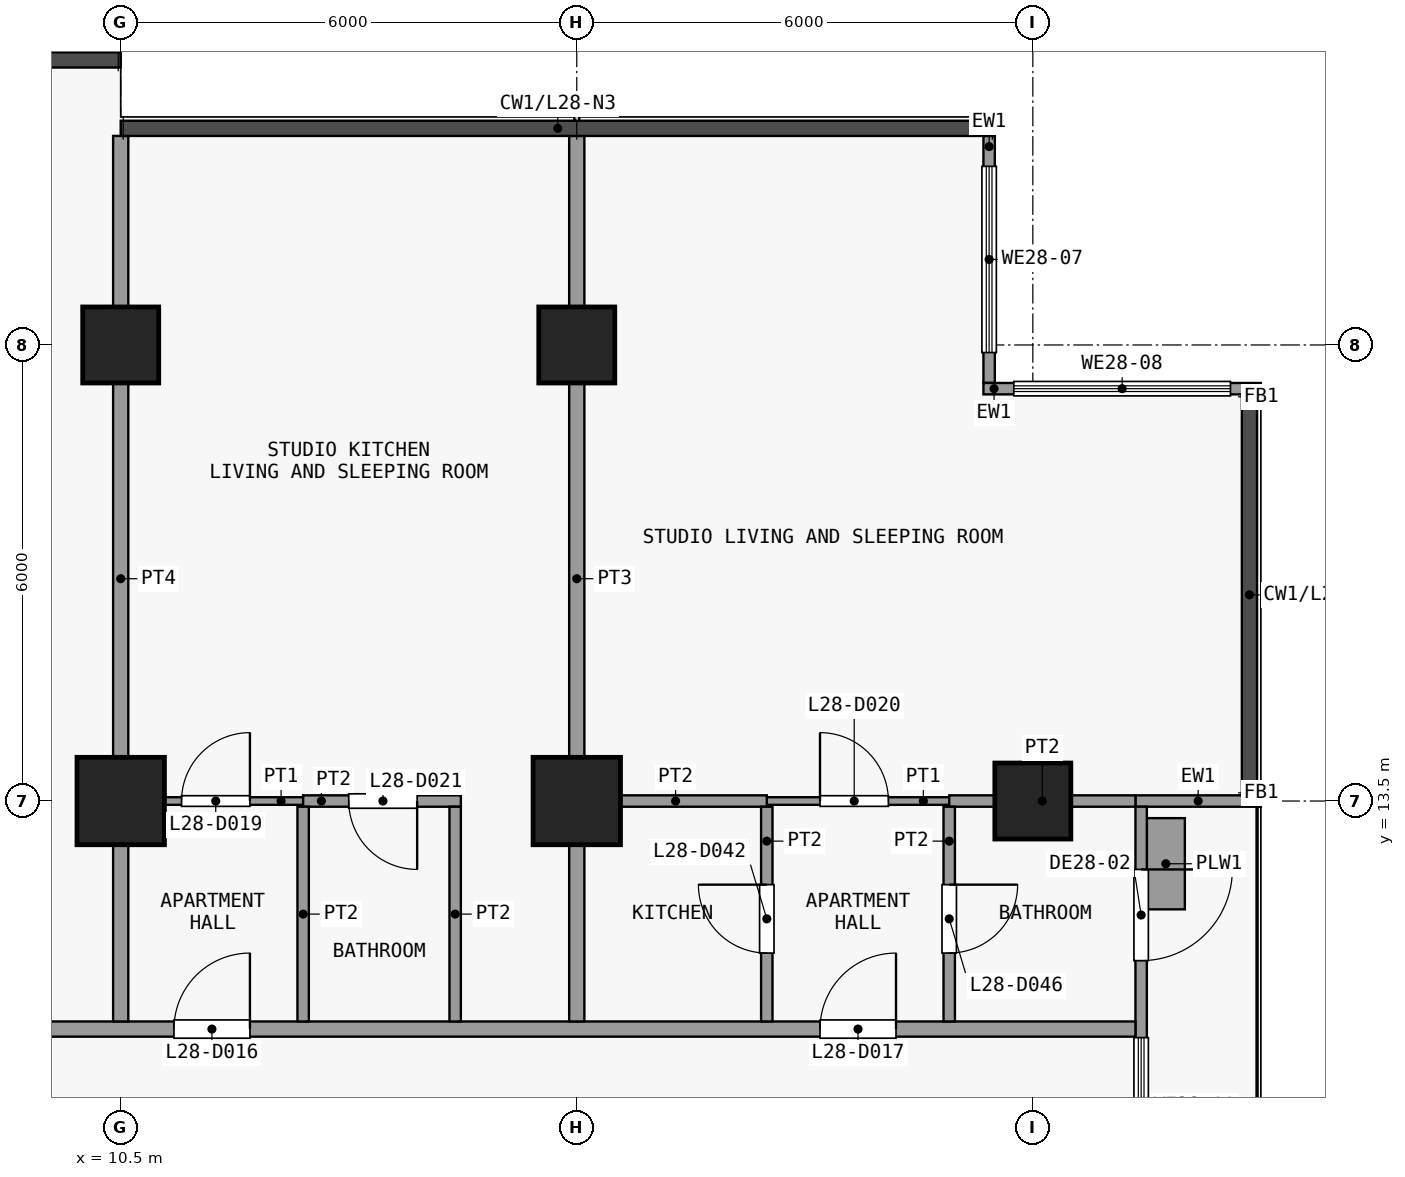
"""IFC4 building model, lengths in metres.
Left out: names, types, materials, properties, quantities, classifications, styles, units other than length and angle.
Written with IfcOpenShell. Run it as: python <this file> out.ifc"""

import sys

from ifc_helpers import new_model, si_unit, direction, frame, frame_2d, origin, origin_2d, place, context, subcontext, project, spatial, rectangle, extrude, element, fill, save


model = new_model("IFC4")
c1 = context("Model", 3, precision=1e-05, world=origin(), true_north=direction((0.0, 1.0)))
c2 = subcontext(c1, "Body", "Model", "MODEL_VIEW")
j1 = project(units=[si_unit("LENGTHUNIT", "METRE"), si_unit("PLANEANGLEUNIT", "RADIAN")], contexts=[c1])
p1 = place(None, origin())
s1 = spatial("IfcSite", under=j1, at=p1, CompositionType="ELEMENT")
p2 = place(p1, origin())
s2 = spatial("IfcBuilding", under=s1, at=p2, CompositionType="ELEMENT")
p3 = place(p2, frame((0.0, 0.0, 113.5)))
s3 = spatial("IfcBuildingStorey", under=s2, at=p3, CompositionType="ELEMENT", Elevation=113.5)
p4 = place(p3, frame((10.5, 13.5, 0.0), z_axis=(0.0, 0.0, 1.0), x_axis=(1.0, 0.0, 0.0)))
e1 = element("IfcColumn", 1, at=p4, inside=s3, PredefinedType="COLUMN", context=c2, shape_type="SweptSolid", body=[
    extrude(rectangle(XDim=1.15, YDim=1.15, at=origin_2d()), origin(), (0.0, 0.0, 1.0), 3.6),
])
p5 = place(p3, frame((10.5, 19.5, 0.0), z_axis=(0.0, 0.0, 1.0), x_axis=(1.0, 0.0, 0.0)))
e2 = element("IfcColumn", 2, at=p5, inside=s3, PredefinedType="COLUMN", context=c2, shape_type="SweptSolid", body=[
    extrude(rectangle(XDim=1.0, YDim=1.0, at=origin_2d()), origin(), (0.0, 0.0, 1.0), 3.6),
])
p6 = place(p3, frame((16.5, 13.5, 0.0), z_axis=(0.0, 0.0, 1.0), x_axis=(1.0, 0.0, 0.0)))
e3 = element("IfcColumn", 3, at=p6, inside=s3, PredefinedType="COLUMN", context=c2, shape_type="SweptSolid", body=[
    extrude(rectangle(XDim=1.15, YDim=1.15, at=origin_2d()), origin(), (0.0, 0.0, 1.0), 3.6),
])
for number, where, z_axis, x_axis in (
    (4, (16.5, 19.5, 0.0), (0.0, 0.0, 1.0), (1.0, 0.0, 0.0)),
    (5, (22.5, 13.5, 0.0), (0.0, 0.0, 1.0), (1.0, 0.0, 0.0)),
):
    element("IfcColumn", number, at=place(p3, frame(where, z_axis=z_axis, x_axis=x_axis)), inside=s3, PredefinedType="COLUMN", context=c2, shape_type="SweptSolid", body=[
        extrude(rectangle(XDim=1.0, YDim=1.0, at=origin_2d()), origin(), (0.0, 0.0, 1.0), 3.6),
    ])
p7 = place(p3, frame((21.925, 22.25, 0.0), z_axis=(0.0, 0.0, 1.0), x_axis=(0.0, -1.0, 0.0)))
e6 = element("IfcWall", 6, at=p7, inside=s3, PredefinedType="SOLIDWALL", context=c2, shape_type="SweptSolid", body=[
    extrude(rectangle(XDim=3.25, YDim=0.15, at=frame_2d((1.625, 0.0))), origin(), (0.0, 0.0, 1.0), 3.3),
])
p8 = place(p7, frame((0.4, 0.0, 0.9)))
e7 = element("IfcOpeningElement", 7, at=p8, cuts=e6, PredefinedType="OPENING", context=c2, shape_type="SweptSolid", body=[
    extrude(rectangle(XDim=2.45, YDim=2.4, at=frame_2d((1.225, 1.2))), frame((0.0, 0.085, 0.0), z_axis=(0.0, -1.0, 0.0), x_axis=(1.0, 0.0, 0.0)), (0.0, 0.0, 1.0), 0.17),
])
p9 = place(p3, frame((21.85, 18.925, 0.0), z_axis=(0.0, 0.0, 1.0), x_axis=(1.0, 0.0, 0.0)))
e8 = element("IfcWall", 8, at=p9, inside=s3, PredefinedType="SOLIDWALL", context=c2, shape_type="SweptSolid", body=[
    extrude(rectangle(XDim=3.65, YDim=0.15, at=frame_2d((1.825, 0.0))), origin(), (0.0, 0.0, 1.0), 3.3),
])
p10 = place(p9, frame((0.4, 0.0, 0.9)))
e9 = element("IfcOpeningElement", 9, at=p10, cuts=e8, PredefinedType="OPENING", context=c2, shape_type="SweptSolid", body=[
    extrude(rectangle(XDim=2.85, YDim=2.4, at=frame_2d((1.425, 1.2))), frame((0.0, 0.085, 0.0), z_axis=(0.0, -1.0, 0.0), x_axis=(1.0, 0.0, 0.0)), (0.0, 0.0, 1.0), 0.17),
])
p11 = place(p3, frame((23.85, 13.5, 0.0), z_axis=(0.0, 0.0, 1.0), x_axis=(1.0, 0.0, 0.0)))
e10 = element("IfcWall", 10, at=p11, inside=s3, PredefinedType="SOLIDWALL", context=c2, shape_type="SweptSolid", body=[
    extrude(rectangle(XDim=1.65, YDim=0.15, at=frame_2d((0.825, 0.0))), origin(), (0.0, 0.0, 1.0), 3.3),
])
p12 = place(p3, frame((23.925, 13.425, 0.0), z_axis=(0.0, 0.0, 1.0), x_axis=(0.0, -1.0, 0.0)))
e11 = element("IfcWall", 11, at=p12, inside=s3, PredefinedType="SOLIDWALL", context=c2, shape_type="SweptSolid", body=[
    extrude(rectangle(XDim=5.85, YDim=0.15, at=frame_2d((2.925, 0.0))), origin(), (0.0, 0.0, 1.0), 3.3),
])
p13 = place(p12, frame((0.825, 0.0, 0.0)))
e12 = element("IfcOpeningElement", 12, at=p13, cuts=e11, PredefinedType="OPENING", context=c2, shape_type="SweptSolid", body=[
    extrude(rectangle(XDim=1.2, YDim=2.4, at=frame_2d((0.6, 1.2))), frame((0.0, 0.085, 0.0), z_axis=(0.0, -1.0, 0.0), x_axis=(1.0, 0.0, 0.0)), (0.0, 0.0, 1.0), 0.17),
])
p14 = place(p12, frame((3.038, 0.0, 0.9)))
e13 = element("IfcOpeningElement", 13, at=p14, cuts=e11, PredefinedType="OPENING", context=c2, shape_type="SweptSolid", body=[
    extrude(rectangle(XDim=1.8, YDim=2.1, at=frame_2d((0.9, 1.05))), frame((0.0, 0.085, 0.0), z_axis=(0.0, -1.0, 0.0), x_axis=(1.0, 0.0, 0.0)), (0.0, 0.0, 1.0), 0.17),
])
p15 = place(p3, frame((24.25, 12.075, 0.0), z_axis=(0.0, 0.0, 1.0), x_axis=(0.0, 1.0, 0.0)))
e14 = element("IfcWall", 14, at=p15, inside=s3, PredefinedType="USERDEFINED", context=c2, shape_type="SweptSolid", body=[
    extrude(rectangle(XDim=1.2, YDim=0.5, at=frame_2d((0.6, 0.0))), origin(), (0.0, 0.0, 1.0), 0.9),
])
p16 = place(p3, frame((-25.35, 10.5, 0.0), z_axis=(0.0, 0.0, 1.0), x_axis=(1.0, 0.0, 0.0)))
e15 = element("IfcWall", 15, at=p16, inside=s3, PredefinedType="PARTITIONING", context=c2, shape_type="SweptSolid", body=[
    extrude(rectangle(XDim=49.2, YDim=0.2, at=frame_2d((24.6, 0.0))), origin(), (0.0, 0.0, 1.0), 3.3),
])
p17 = place(p16, frame((10.55, 0.0, 0.0)))
e16 = element("IfcOpeningElement", 16, at=p17, cuts=e15, PredefinedType="OPENING", context=c2, shape_type="SweptSolid", body=[
    extrude(rectangle(XDim=1.0, YDim=2.1, at=frame_2d((0.5, 1.05))), frame((0.0, 0.11, 0.0), z_axis=(0.0, -1.0, 0.0), x_axis=(1.0, 0.0, 0.0)), (0.0, 0.0, 1.0), 0.22),
])
p18 = place(p16, frame((17.35, 0.0, 0.0)))
e17 = element("IfcOpeningElement", 17, at=p18, cuts=e15, PredefinedType="OPENING", context=c2, shape_type="SweptSolid", body=[
    extrude(rectangle(XDim=0.9, YDim=2.1, at=frame_2d((0.45, 1.05))), frame((0.0, 0.11, 0.0), z_axis=(0.0, -1.0, 0.0), x_axis=(1.0, 0.0, 0.0)), (0.0, 0.0, 1.0), 0.22),
])
p19 = place(p16, frame((24.85, 0.0, 0.0)))
e18 = element("IfcOpeningElement", 18, at=p19, cuts=e15, PredefinedType="OPENING", context=c2, shape_type="SweptSolid", body=[
    extrude(rectangle(XDim=0.9, YDim=2.1, at=frame_2d((0.45, 1.05))), frame((0.0, 0.11, 0.0), z_axis=(0.0, -1.0, 0.0), x_axis=(1.0, 0.0, 0.0)), (0.0, 0.0, 1.0), 0.22),
])
p20 = place(p16, frame((32.35, 0.0, 0.0)))
e19 = element("IfcOpeningElement", 19, at=p20, cuts=e15, PredefinedType="OPENING", context=c2, shape_type="SweptSolid", body=[
    extrude(rectangle(XDim=0.9, YDim=2.1, at=frame_2d((0.45, 1.05))), frame((0.0, 0.11, 0.0), z_axis=(0.0, -1.0, 0.0), x_axis=(1.0, 0.0, 0.0)), (0.0, 0.0, 1.0), 0.22),
])
p21 = place(p16, frame((36.55, 0.0, 0.0)))
e20 = element("IfcOpeningElement", 20, at=p21, cuts=e15, PredefinedType="OPENING", context=c2, shape_type="SweptSolid", body=[
    extrude(rectangle(XDim=1.0, YDim=2.1, at=frame_2d((0.5, 1.05))), frame((0.0, 0.11, 0.0), z_axis=(0.0, -1.0, 0.0), x_axis=(1.0, 0.0, 0.0)), (0.0, 0.0, 1.0), 0.22),
])
p22 = place(p16, frame((45.05, 0.0, 0.0)))
e21 = element("IfcOpeningElement", 21, at=p22, cuts=e15, PredefinedType="OPENING", context=c2, shape_type="SweptSolid", body=[
    extrude(rectangle(XDim=1.0, YDim=2.1, at=frame_2d((0.5, 1.05))), frame((0.0, 0.11, 0.0), z_axis=(0.0, -1.0, 0.0), x_axis=(1.0, 0.0, 0.0)), (0.0, 0.0, 1.0), 0.22),
])
p23 = place(p3, frame((10.6, 13.5, 0.0), z_axis=(0.0, 0.0, 1.0), x_axis=(1.0, 0.0, 0.0)))
e22 = element("IfcWall", 22, at=p23, inside=s3, PredefinedType="PARTITIONING", context=c2, shape_type="SweptSolid", body=[
    extrude(rectangle(XDim=2.3, YDim=0.1, at=frame_2d((1.15, 0.0))), origin(), (0.0, 0.0, 1.0), 3.3),
])
p24 = place(p23, frame((0.7, 0.0, 0.0)))
e23 = element("IfcOpeningElement", 23, at=p24, cuts=e22, PredefinedType="OPENING", context=c2, shape_type="SweptSolid", body=[
    extrude(rectangle(XDim=0.9, YDim=2.1, at=frame_2d((0.45, 1.05))), frame((0.0, 0.06, 0.0), z_axis=(0.0, -1.0, 0.0), x_axis=(1.0, 0.0, 0.0)), (0.0, 0.0, 1.0), 0.12),
])
p25 = place(p3, frame((19.0, 13.5, 0.0), z_axis=(0.0, 0.0, 1.0), x_axis=(1.0, 0.0, 0.0)))
e24 = element("IfcWall", 24, at=p25, inside=s3, PredefinedType="PARTITIONING", context=c2, shape_type="SweptSolid", body=[
    extrude(rectangle(XDim=2.4, YDim=0.1, at=frame_2d((1.2, 0.0))), origin(), (0.0, 0.0, 1.0), 3.3),
])
p26 = place(p25, frame((0.7, 0.0, 0.0)))
e25 = element("IfcOpeningElement", 25, at=p26, cuts=e24, PredefinedType="OPENING", context=c2, shape_type="SweptSolid", body=[
    extrude(rectangle(XDim=0.9, YDim=2.1, at=frame_2d((0.45, 1.05))), frame((0.0, 0.06, 0.0), z_axis=(0.0, -1.0, 0.0), x_axis=(1.0, 0.0, 0.0)), (0.0, 0.0, 1.0), 0.12),
])
p27 = place(p3, frame((12.9, 13.5, 0.0), z_axis=(0.0, 0.0, 1.0), x_axis=(1.0, 0.0, 0.0)))
e26 = element("IfcWall", 26, at=p27, inside=s3, PredefinedType="PARTITIONING", context=c2, shape_type="SweptSolid", body=[
    extrude(rectangle(XDim=2.075, YDim=0.15, at=frame_2d((1.038, 0.0))), origin(), (0.0, 0.0, 1.0), 3.3),
])
p28 = place(p27, frame((0.6, 0.0, 0.0)))
e27 = element("IfcOpeningElement", 27, at=p28, cuts=e26, PredefinedType="OPENING", context=c2, shape_type="SweptSolid", body=[
    extrude(rectangle(XDim=0.9, YDim=2.1, at=frame_2d((0.45, 1.05))), frame((0.0, 0.085, 0.0), z_axis=(0.0, -1.0, 0.0), x_axis=(1.0, 0.0, 0.0)), (0.0, 0.0, 1.0), 0.17),
])
p29 = place(p3, frame((16.6, 13.5, 0.0), z_axis=(0.0, 0.0, 1.0), x_axis=(1.0, 0.0, 0.0)))
e28 = element("IfcWall", 28, at=p29, inside=s3, PredefinedType="PARTITIONING", context=c2, shape_type="SweptSolid", body=[
    extrude(rectangle(XDim=2.4, YDim=0.15, at=frame_2d((1.2, 0.0))), origin(), (0.0, 0.0, 1.0), 3.3),
])
p30 = place(p3, frame((21.4, 13.5, 0.0), z_axis=(0.0, 0.0, 1.0), x_axis=(1.0, 0.0, 0.0)))
e29 = element("IfcWall", 29, at=p30, inside=s3, PredefinedType="PARTITIONING", context=c2, shape_type="SweptSolid", body=[
    extrude(rectangle(XDim=2.45, YDim=0.15, at=frame_2d((1.225, 0.0))), origin(), (0.0, 0.0, 1.0), 3.3),
])
p31 = place(p3, frame((10.5, 10.6, 0.0), z_axis=(0.0, 0.0, 1.0), x_axis=(0.0, 1.0, 0.0)))
e30 = element("IfcWall", 30, at=p31, inside=s3, PredefinedType="PARTITIONING", context=c2, shape_type="SweptSolid", body=[
    extrude(rectangle(XDim=11.65, YDim=0.2, at=frame_2d((5.825, 0.0))), origin(), (0.0, 0.0, 1.0), 3.3),
])
for number, where, z_axis, x_axis in (
    (31, (12.9, 10.6, 0.0), (0.0, 0.0, 1.0), (0.0, 1.0, 0.0)),
    (32, (14.9, 10.6, 0.0), (0.0, 0.0, 1.0), (0.0, 1.0, 0.0)),
):
    element("IfcWall", number, at=place(p3, frame(where, z_axis=z_axis, x_axis=x_axis)), inside=s3, PredefinedType="PARTITIONING", context=c2, shape_type="SweptSolid", body=[
        extrude(rectangle(XDim=2.825, YDim=0.15, at=frame_2d((1.413, 0.0))), origin(), (0.0, 0.0, 1.0), 3.3),
    ])
p32 = place(p3, frame((16.5, 10.6, 0.0), z_axis=(0.0, 0.0, 1.0), x_axis=(0.0, 1.0, 0.0)))
e33 = element("IfcWall", 33, at=p32, inside=s3, PredefinedType="PARTITIONING", context=c2, shape_type="SweptSolid", body=[
    extrude(rectangle(XDim=11.65, YDim=0.2, at=frame_2d((5.825, 0.0))), origin(), (0.0, 0.0, 1.0), 3.3),
])
p33 = place(p3, frame((19.0, 10.6, 0.0), z_axis=(0.0, 0.0, 1.0), x_axis=(0.0, 1.0, 0.0)))
e34 = element("IfcWall", 34, at=p33, inside=s3, PredefinedType="PARTITIONING", context=c2, shape_type="SweptSolid", body=[
    extrude(rectangle(XDim=2.825, YDim=0.15, at=frame_2d((1.413, 0.0))), origin(), (0.0, 0.0, 1.0), 3.3),
])
p34 = place(p33, frame((0.9, 0.0, 0.0)))
e35 = element("IfcOpeningElement", 35, at=p34, cuts=e34, PredefinedType="OPENING", context=c2, shape_type="SweptSolid", body=[
    extrude(rectangle(XDim=0.9, YDim=2.1, at=frame_2d((0.45, 1.05))), frame((0.0, 0.085, 0.0), z_axis=(0.0, -1.0, 0.0), x_axis=(1.0, 0.0, 0.0)), (0.0, 0.0, 1.0), 0.17),
])
p35 = place(p3, frame((21.4, 10.6, 0.0), z_axis=(0.0, 0.0, 1.0), x_axis=(0.0, 1.0, 0.0)))
e36 = element("IfcWall", 36, at=p35, inside=s3, PredefinedType="PARTITIONING", context=c2, shape_type="SweptSolid", body=[
    extrude(rectangle(XDim=2.825, YDim=0.15, at=frame_2d((1.413, 0.0))), origin(), (0.0, 0.0, 1.0), 3.3),
])
p36 = place(p35, frame((0.9, 0.0, 0.0)))
e37 = element("IfcOpeningElement", 37, at=p36, cuts=e36, PredefinedType="OPENING", context=c2, shape_type="SweptSolid", body=[
    extrude(rectangle(XDim=0.9, YDim=2.1, at=frame_2d((0.45, 1.05))), frame((0.0, 0.085, 0.0), z_axis=(0.0, -1.0, 0.0), x_axis=(1.0, 0.0, 0.0)), (0.0, 0.0, 1.0), 0.17),
])
p37 = place(p8, origin())
e38 = element("IfcWindow", 38, at=p37, inside=s3, PartitioningType="SINGLE_PANEL", PredefinedType="WINDOW", context=c2, shape_type="SweptSolid", body=[
    extrude(rectangle(XDim=2.45, YDim=2.4, at=frame_2d((1.225, 1.2))), frame((0.0, 0.03, 0.0), z_axis=(0.0, -1.0, 0.0), x_axis=(1.0, 0.0, 0.0)), (0.0, 0.0, 1.0), 0.06),
])
fill(e7, e38)
p38 = place(p10, origin())
e39 = element("IfcWindow", 39, at=p38, inside=s3, PartitioningType="SINGLE_PANEL", PredefinedType="WINDOW", context=c2, shape_type="SweptSolid", body=[
    extrude(rectangle(XDim=2.85, YDim=2.4, at=frame_2d((1.425, 1.2))), frame((0.0, 0.03, 0.0), z_axis=(0.0, -1.0, 0.0), x_axis=(1.0, 0.0, 0.0)), (0.0, 0.0, 1.0), 0.06),
])
fill(e9, e39)
p39 = place(p13, origin())
e40 = element("IfcDoor", 40, at=p39, inside=s3, OperationType="SINGLE_SWING_LEFT", PredefinedType="DOOR", context=c2, shape_type="SweptSolid", body=[
    extrude(rectangle(XDim=1.2, YDim=2.4, at=frame_2d((0.6, 1.2))), frame((0.0, 0.025, 0.0), z_axis=(0.0, -1.0, 0.0), x_axis=(1.0, 0.0, 0.0)), (0.0, 0.0, 1.0), 0.05),
])
fill(e12, e40)
p40 = place(p14, origin())
e41 = element("IfcWindow", 41, at=p40, inside=s3, PartitioningType="SINGLE_PANEL", PredefinedType="WINDOW", context=c2, shape_type="SweptSolid", body=[
    extrude(rectangle(XDim=1.8, YDim=2.1, at=frame_2d((0.9, 1.05))), frame((0.0, 0.03, 0.0), z_axis=(0.0, -1.0, 0.0), x_axis=(1.0, 0.0, 0.0)), (0.0, 0.0, 1.0), 0.06),
])
fill(e13, e41)
p41 = place(p21, origin())
e42 = element("IfcDoor", 42, at=p41, inside=s3, OperationType="SINGLE_SWING_LEFT", PredefinedType="DOOR", context=c2, shape_type="SweptSolid", body=[
    extrude(rectangle(XDim=1.0, YDim=2.1, at=frame_2d((0.5, 1.05))), frame((0.0, 0.025, 0.0), z_axis=(0.0, -1.0, 0.0), x_axis=(1.0, 0.0, 0.0)), (0.0, 0.0, 1.0), 0.05),
])
fill(e20, e42)
p42 = place(p22, origin())
e43 = element("IfcDoor", 43, at=p42, inside=s3, OperationType="SINGLE_SWING_LEFT", PredefinedType="DOOR", context=c2, shape_type="SweptSolid", body=[
    extrude(rectangle(XDim=1.0, YDim=2.1, at=frame_2d((0.5, 1.05))), frame((0.0, 0.025, 0.0), z_axis=(0.0, -1.0, 0.0), x_axis=(1.0, 0.0, 0.0)), (0.0, 0.0, 1.0), 0.05),
])
fill(e21, e43)
p43 = place(p24, origin())
e44 = element("IfcDoor", 44, at=p43, inside=s3, OperationType="SINGLE_SWING_LEFT", PredefinedType="DOOR", context=c2, shape_type="SweptSolid", body=[
    extrude(rectangle(XDim=0.9, YDim=2.1, at=frame_2d((0.45, 1.05))), frame((0.0, 0.025, 0.0), z_axis=(0.0, -1.0, 0.0), x_axis=(1.0, 0.0, 0.0)), (0.0, 0.0, 1.0), 0.05),
])
fill(e23, e44)
p44 = place(p26, origin())
e45 = element("IfcDoor", 45, at=p44, inside=s3, OperationType="SINGLE_SWING_RIGHT", PredefinedType="DOOR", context=c2, shape_type="SweptSolid", body=[
    extrude(rectangle(XDim=0.9, YDim=2.1, at=frame_2d((0.45, 1.05))), frame((0.0, 0.025, 0.0), z_axis=(0.0, -1.0, 0.0), x_axis=(1.0, 0.0, 0.0)), (0.0, 0.0, 1.0), 0.05),
])
fill(e25, e45)
p45 = place(p28, origin())
e46 = element("IfcDoor", 46, at=p45, inside=s3, OperationType="SINGLE_SWING_RIGHT", PredefinedType="DOOR", context=c2, shape_type="SweptSolid", body=[
    extrude(rectangle(XDim=0.9, YDim=2.1, at=frame_2d((0.45, 1.05))), frame((0.0, 0.025, 0.0), z_axis=(0.0, -1.0, 0.0), x_axis=(1.0, 0.0, 0.0)), (0.0, 0.0, 1.0), 0.05),
])
fill(e27, e46)
p46 = place(p34, origin())
e47 = element("IfcDoor", 47, at=p46, inside=s3, OperationType="SINGLE_SWING_LEFT", PredefinedType="DOOR", context=c2, shape_type="SweptSolid", body=[
    extrude(rectangle(XDim=0.9, YDim=2.1, at=frame_2d((0.45, 1.05))), frame((0.0, 0.025, 0.0), z_axis=(0.0, -1.0, 0.0), x_axis=(1.0, 0.0, 0.0)), (0.0, 0.0, 1.0), 0.05),
])
fill(e35, e47)
p47 = place(p36, origin())
e48 = element("IfcDoor", 48, at=p47, inside=s3, OperationType="SINGLE_SWING_RIGHT", PredefinedType="DOOR", context=c2, shape_type="SweptSolid", body=[
    extrude(rectangle(XDim=0.9, YDim=2.1, at=frame_2d((0.45, 1.05))), frame((0.0, 0.025, 0.0), z_axis=(0.0, -1.0, 0.0), x_axis=(1.0, 0.0, 0.0)), (0.0, 0.0, 1.0), 0.05),
])
fill(e37, e48)
save(model, sys.argv[1])
